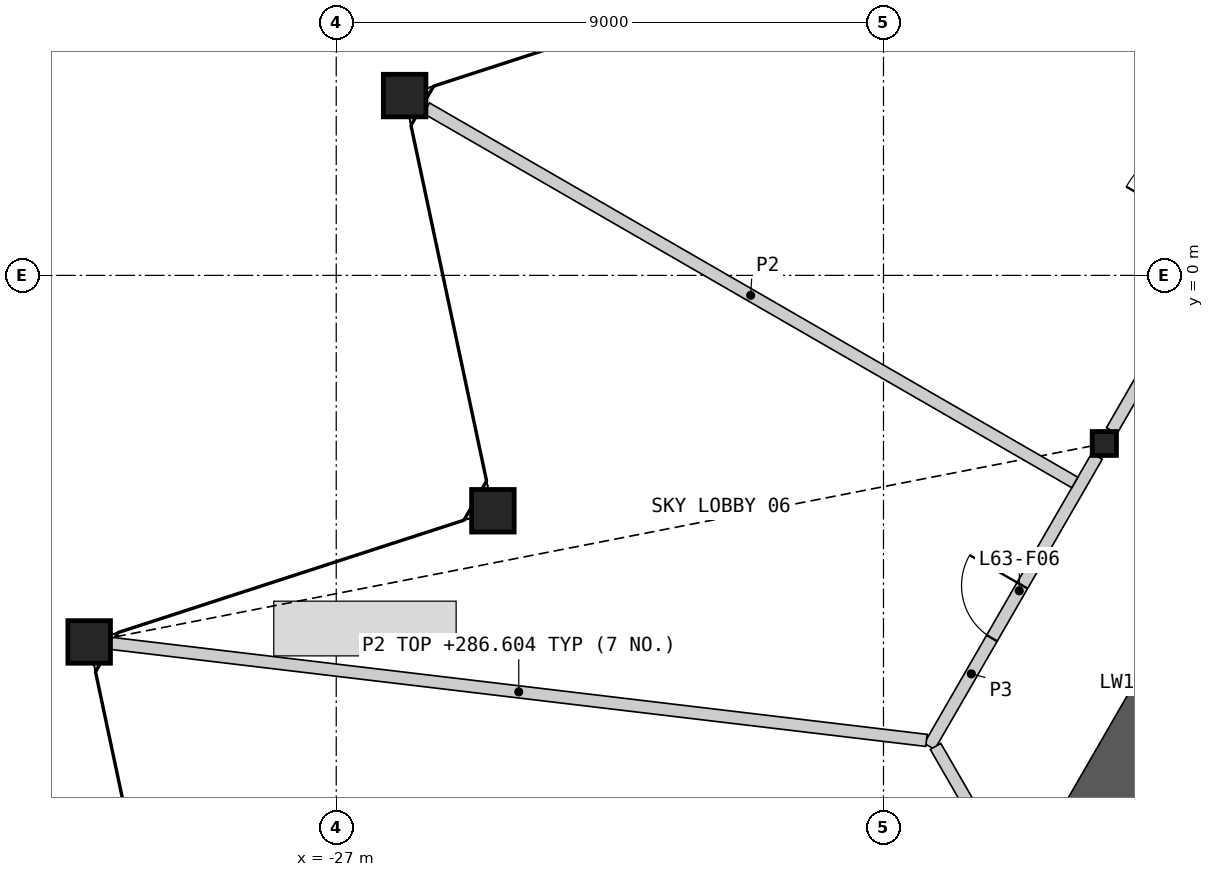
"""IFC4 building model, lengths in metres.
Left out: names, types, materials, properties, quantities, classifications, styles, units other than length and angle.
Written with IfcOpenShell. Run it as: python <this file> out.ifc"""

import sys

from ifc_helpers import new_model, si_unit, direction, frame, frame_2d, origin, origin_2d, place, context, subcontext, project, spatial, polyline, rectangle, hollow_rectangle, i_section, outline, extrude, element, fill, save


model = new_model("IFC4")
c1 = context("Model", 3, precision=1e-05, world=origin(), true_north=direction((0.0, 1.0)))
c2 = subcontext(c1, "Body", "Model", "MODEL_VIEW")
j1 = project(units=[si_unit("LENGTHUNIT", "METRE"), si_unit("PLANEANGLEUNIT", "RADIAN")], contexts=[c1])
p1 = place(None, origin())
s1 = spatial("IfcSite", under=j1, at=p1, CompositionType="ELEMENT")
p2 = place(p1, origin())
s2 = spatial("IfcBuilding", under=s1, at=p2, CompositionType="ELEMENT")
p3 = place(p2, frame((0.0, 0.0, 277.8)))
s3 = spatial("IfcBuildingStorey", under=s2, at=p3, CompositionType="ELEMENT", Elevation=277.8)
for number, where, z_axis, x_axis in (
    (1, (-25.875, 2.957, 0.0), (0.0, 0.0, 1.0), (1.0, 0.0, 0.0)),
    (2, (-24.423, -3.872, 0.0), (0.0, 0.0, 1.0), (1.0, 0.0, 0.0)),
    (3, (-31.063, -6.029, 0.0), (0.0, 0.0, 1.0), (1.0, 0.0, 0.0)),
):
    element("IfcColumn", number, at=place(p3, frame(where, z_axis=z_axis, x_axis=x_axis)), inside=s3, PredefinedType="COLUMN", context=c2, shape_type="SweptSolid", body=[
        extrude(hollow_rectangle(XDim=0.7, YDim=0.7, WallThickness=0.045, at=origin_2d()), origin(), (0.0, 0.0, 1.0), 10.0),
    ])
p4 = place(p3, frame((-14.368, -2.765, 0.0), z_axis=(0.0, 0.0, 1.0), x_axis=(1.0, 0.0, 0.0)))
e4 = element("IfcColumn", 4, at=p4, inside=s3, PredefinedType="COLUMN", context=c2, shape_type="SweptSolid", body=[
    extrude(i_section(OverallWidth=0.399, OverallDepth=0.393, WebThickness=0.023, FlangeThickness=0.037, at=origin_2d()), origin(), (0.0, 0.0, 1.0), 10.0),
])
p5 = place(p3, frame((-12.418, -5.488, 0.0), z_axis=(0.0, 0.0, 1.0), x_axis=(-0.499931460552, -0.866064971437, 0.0)))
e5 = element("IfcWall", 5, at=p5, inside=s3, PredefinedType="SHEAR", context=c2, shape_type="SweptSolid", body=[
    extrude(rectangle(XDim=1.786, YDim=1.3, at=frame_2d((0.893, 0.0))), origin(), (0.0, 0.0, 1.0), 9.65),
])
p6 = place(p3, origin())
e6 = element("IfcWall", 6, at=p6, inside=s3, PredefinedType="SHEAR", context=c2, shape_type="SweptSolid", body=[
    extrude(outline(polyline([(-13.874, -6.71), (-12.748, -7.36), (-12.748, -8.66), (-15.0, -8.66), (-13.874, -6.71)])), origin(), (0.0, 0.0, 1.0), 9.65),
])
p7 = place(p3, frame((-14.247, -2.556, 0.0), z_axis=(0.0, 0.0, 1.0), x_axis=(0.49998193945, 0.866035830797, 0.0)))
e7 = element("IfcWall", 7, at=p7, inside=s3, PredefinedType="PARTITIONING", context=c2, shape_type="SweptSolid", body=[
    extrude(rectangle(XDim=9.094, YDim=0.2, at=frame_2d((4.547, 0.0))), origin(), (0.0, 0.0, 1.0), 9.65),
])
p8 = place(p7, frame((3.597, 0.0, 0.0)))
e8 = element("IfcOpeningElement", 8, at=p8, cuts=e7, PredefinedType="OPENING", context=c2, shape_type="SweptSolid", body=[
    extrude(rectangle(XDim=1.8, YDim=2.1, at=frame_2d((0.9, 1.05))), frame((0.0, 0.11, 0.0), z_axis=(0.0, -1.0, 0.0), x_axis=(1.0, 0.0, 0.0)), (0.0, 0.0, 1.0), 0.22),
])
p9 = place(p3, frame((-17.244, -7.747, 0.0), z_axis=(0.0, 0.0, 1.0), x_axis=(0.500017753321, 0.866015153657, 0.0)))
e9 = element("IfcWall", 9, at=p9, inside=s3, PredefinedType="PARTITIONING", context=c2, shape_type="SweptSolid", body=[
    extrude(rectangle(XDim=5.51, YDim=0.2, at=frame_2d((2.755, 0.0))), origin(), (0.0, 0.0, 1.0), 9.65),
])
p10 = place(p9, frame((2.055, 0.0, 0.0)))
e10 = element("IfcOpeningElement", 10, at=p10, cuts=e9, PredefinedType="OPENING", context=c2, shape_type="SweptSolid", body=[
    extrude(rectangle(XDim=1.0, YDim=2.1, at=frame_2d((0.5, 1.05))), frame((0.0, 0.11, 0.0), z_axis=(0.0, -1.0, 0.0), x_axis=(1.0, 0.0, 0.0)), (0.0, 0.0, 1.0), 0.22),
])
p11 = place(p3, frame((-17.144, -7.747, 0.0), z_axis=(0.0, 0.0, 1.0), x_axis=(0.499958791762, -0.866049194065, 0.0)))
e11 = element("IfcWall", 11, at=p11, inside=s3, PredefinedType="PARTITIONING", context=c2, shape_type="SweptSolid", body=[
    extrude(rectangle(XDim=3.726, YDim=0.2, at=frame_2d((1.863, 0.0))), origin(), (0.0, 0.0, 1.0), 9.65),
])
p12 = place(p3, frame((-30.703, -6.052, 0.0), z_axis=(0.0, 0.0, 1.0), x_axis=(0.992988122615, -0.118214163049, 0.0)))
e12 = element("IfcWall", 12, at=p12, inside=s3, PredefinedType="PARTITIONING", context=c2, shape_type="SweptSolid", body=[
    extrude(rectangle(XDim=13.505, YDim=0.2, at=frame_2d((6.752, 0.0))), origin(), (0.0, 0.0, 1.0), 8.804),
])
p13 = place(p3, frame((-25.515, 2.749, 0.0), z_axis=(0.0, 0.0, 1.0), x_axis=(0.866024427045, -0.500001691758, 0.0)))
e13 = element("IfcWall", 13, at=p13, inside=s3, PredefinedType="PARTITIONING", context=c2, shape_type="SweptSolid", body=[
    extrude(rectangle(XDim=12.311, YDim=0.2, at=frame_2d((6.156, 0.0))), origin(), (0.0, 0.0, 1.0), 8.804),
])
p14 = place(p10, origin())
e14 = element("IfcDoor", 14, at=p14, inside=s3, OperationType="SINGLE_SWING_RIGHT", PredefinedType="DOOR", context=c2, shape_type="SweptSolid", body=[
    extrude(rectangle(XDim=1.0, YDim=2.1, at=frame_2d((0.5, 1.05))), frame((0.0, 0.025, 0.0), z_axis=(0.0, -1.0, 0.0), x_axis=(1.0, 0.0, 0.0)), (0.0, 0.0, 1.0), 0.05),
])
fill(e10, e14)
save(model, sys.argv[1])
